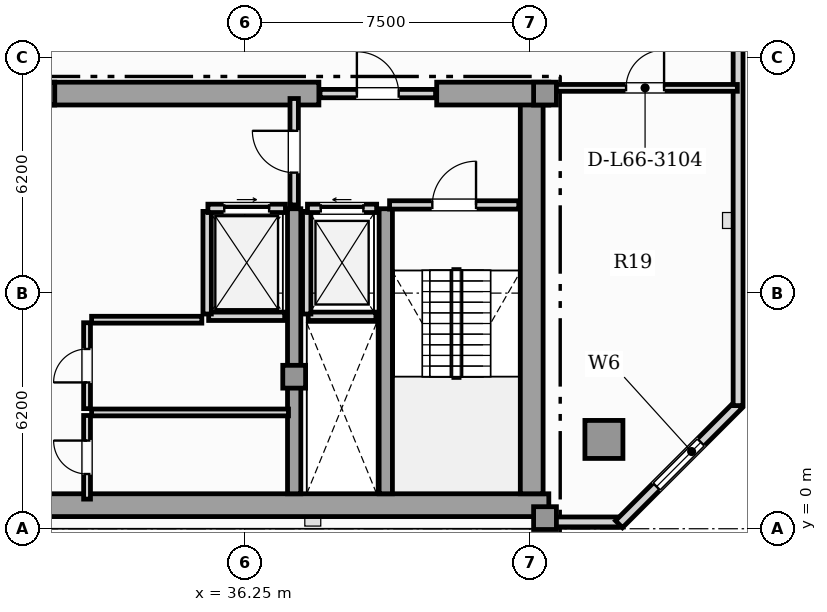
"""IFC4 building model, lengths in metres.
Left out: names, types, materials, properties, quantities, classifications, styles, units other than length and angle.
Written with IfcOpenShell. Run it as: python <this file> out.ifc"""

import sys

from ifc_helpers import new_model, si_unit, direction, frame, frame_2d, origin, origin_2d, place, context, subcontext, project, spatial, rectangle, hollow_rectangle, extrude, element, fill, save


model = new_model("IFC4")
c1 = context("Model", 3, precision=1e-05, world=origin(), true_north=direction((0.0, 1.0)))
c2 = subcontext(c1, "Body", "Model", "MODEL_VIEW")
j1 = project(units=[si_unit("LENGTHUNIT", "METRE"), si_unit("PLANEANGLEUNIT", "RADIAN")], contexts=[c1])
p1 = place(None, origin())
s1 = spatial("IfcSite", under=j1, at=p1, CompositionType="ELEMENT")
p2 = place(p1, origin())
s2 = spatial("IfcBuilding", under=s1, at=p2, CompositionType="ELEMENT")
p3 = place(p2, frame((0.0, 0.0, 268.3)))
s3 = spatial("IfcBuildingStorey", under=s2, at=p3, CompositionType="ELEMENT", Elevation=268.3)
p4 = place(p3, frame((13.25, 0.62, 0.0), z_axis=(0.0, 0.0, 1.0), x_axis=(1.0, 0.0, 0.0)))
e1 = element("IfcWall", 1, at=p4, inside=s3, PredefinedType="SHEAR", context=c2, shape_type="SweptSolid", body=[
    extrude(rectangle(XDim=31.0, YDim=0.6, at=frame_2d((15.5, 0.0))), origin(), (0.0, 0.0, 1.0), 3.65),
])
p5 = place(p3, frame((43.8, 0.92, 0.0), z_axis=(0.0, 0.0, 1.0), x_axis=(0.0, 1.0, 0.0)))
e2 = element("IfcWall", 2, at=p5, inside=s3, PredefinedType="SHEAR", context=c2, shape_type="SweptSolid", body=[
    extrude(rectangle(XDim=10.53, YDim=0.6, at=frame_2d((5.265, 0.0))), origin(), (0.0, 0.0, 1.0), 3.65),
])
p6 = place(p3, frame((30.9, 11.45, 0.0), z_axis=(0.0, 0.0, 1.0), x_axis=(1.0, 0.0, 0.0)))
e3 = element("IfcWall", 3, at=p6, inside=s3, PredefinedType="SHEAR", context=c2, shape_type="SweptSolid", body=[
    extrude(rectangle(XDim=7.3, YDim=0.6, at=frame_2d((3.65, 0.0))), origin(), (0.0, 0.0, 1.0), 3.65),
])
p7 = place(p3, frame((41.3, 11.45, 0.0), z_axis=(0.0, 0.0, 1.0), x_axis=(1.0, 0.0, 0.0)))
e4 = element("IfcWall", 4, at=p7, inside=s3, PredefinedType="SHEAR", context=c2, shape_type="SweptSolid", body=[
    extrude(rectangle(XDim=2.95, YDim=0.6, at=frame_2d((1.475, 0.0))), origin(), (0.0, 0.0, 1.0), 3.65),
])
for number, where, z_axis, x_axis in (
    (5, (37.55, 0.92, 0.0), (0.0, 0.0, 1.0), (0.0, 1.0, 0.0)),
    (6, (39.96, 0.92, 0.0), (0.0, 0.0, 1.0), (0.0, 1.0, 0.0)),
):
    element("IfcWall", number, at=place(p3, frame(where, z_axis=z_axis, x_axis=x_axis)), inside=s3, PredefinedType="SHEAR", context=c2, shape_type="SweptSolid", body=[
        extrude(rectangle(XDim=7.5, YDim=0.35, at=frame_2d((3.75, 0.0))), origin(), (0.0, 0.0, 1.0), 3.65),
    ])
for number, where, z_axis, x_axis in (
    (7, (44.15, 0.28, 0.0), (0.0, 0.0, 1.0), (1.0, 0.0, 0.0)),
    (8, (44.15, 11.45, 0.0), (0.0, 0.0, 1.0), (1.0, 0.0, 0.0)),
    (9, (37.55, 4.0, 0.0), (0.0, 0.0, 1.0), (1.0, 0.0, 0.0)),
    (10, (30.95, 11.45, 0.0), (0.0, 0.0, 1.0), (1.0, 0.0, 0.0)),
):
    element("IfcColumn", number, at=place(p3, frame(where, z_axis=z_axis, x_axis=x_axis)), inside=s3, PredefinedType="COLUMN", context=c2, shape_type="SweptSolid", body=[
        extrude(rectangle(XDim=0.6, YDim=0.6, at=origin_2d()), origin(), (0.0, 0.0, 1.0), 3.85),
    ])
p8 = place(p3, frame((45.7, 2.35, 0.0), z_axis=(0.0, 0.0, 1.0), x_axis=(1.0, 0.0, 0.0)))
e11 = element("IfcColumn", 11, at=p8, inside=s3, PredefinedType="USERDEFINED", context=c2, shape_type="SweptSolid", body=[
    extrude(hollow_rectangle(XDim=1.0, YDim=1.0, WallThickness=0.06, at=origin_2d()), origin(), (0.0, 0.0, 1.0), 3.85),
])
p9 = place(p3, frame((44.25, 0.18, 0.0), z_axis=(0.0, 0.0, 1.0), x_axis=(1.0, 0.0, 0.0)))
e12 = element("IfcWall", 12, at=p9, inside=s3, PredefinedType="SOLIDWALL", context=c2, shape_type="SweptSolid", body=[
    extrude(rectangle(XDim=1.87, YDim=0.26, at=frame_2d((0.935, 0.0))), origin(), (0.0, 0.0, 1.0), 3.65),
])
p10 = place(p3, frame((46.097, 0.12, 0.0), z_axis=(0.0, 0.0, 1.0), x_axis=(0.707079321262, 0.707134240044, 0.0)))
e13 = element("IfcWall", 13, at=p10, inside=s3, PredefinedType="SOLIDWALL", context=c2, shape_type="SweptSolid", body=[
    extrude(rectangle(XDim=4.446, YDim=0.26, at=frame_2d((2.223, 0.0))), origin(), (0.0, 0.0, 1.0), 3.65),
])
p11 = place(p10, frame((1.398, 0.0, 0.88)))
e14 = element("IfcOpeningElement", 14, at=p11, cuts=e13, PredefinedType="OPENING", context=c2, shape_type="SweptSolid", body=[
    extrude(rectangle(XDim=1.65, YDim=2.0, at=frame_2d((0.825, 1.0))), frame((0.0, 0.14, 0.0), z_axis=(0.0, -1.0, 0.0), x_axis=(1.0, 0.0, 0.0)), (0.0, 0.0, 1.0), 0.28),
])
p12 = place(p3, frame((49.23, 3.24, 0.0), z_axis=(0.0, 0.0, 1.0), x_axis=(0.0, 1.0, 0.0)))
e15 = element("IfcWall", 15, at=p12, inside=s3, PredefinedType="SOLIDWALL", context=c2, shape_type="SweptSolid", body=[
    extrude(rectangle(XDim=16.195, YDim=0.26, at=frame_2d((8.097, 0.0))), origin(), (0.0, 0.0, 1.0), 3.65),
])
p13 = place(p12, frame((11.055, 0.0, 0.95)))
e16 = element("IfcOpeningElement", 16, at=p13, cuts=e15, PredefinedType="OPENING", context=c2, shape_type="SweptSolid", body=[
    extrude(rectangle(XDim=0.9, YDim=1.5, at=frame_2d((0.45, 0.75))), frame((0.0, 0.14, 0.0), z_axis=(0.0, -1.0, 0.0), x_axis=(1.0, 0.0, 0.0)), (0.0, 0.0, 1.0), 0.28),
])
p14 = place(p12, frame((12.817, 0.0, 0.88)))
e17 = element("IfcOpeningElement", 17, at=p14, cuts=e15, PredefinedType="OPENING", context=c2, shape_type="SweptSolid", body=[
    extrude(rectangle(XDim=1.65, YDim=2.0, at=frame_2d((0.825, 1.0))), frame((0.0, 0.14, 0.0), z_axis=(0.0, -1.0, 0.0), x_axis=(1.0, 0.0, 0.0)), (0.0, 0.0, 1.0), 0.28),
])
p15 = place(p3, frame((37.92, 5.59, 0.0), z_axis=(0.0, 0.0, 1.0), x_axis=(1.0, 0.0, 0.0)))
e18 = element("IfcWall", 18, at=p15, inside=s3, PredefinedType="SOLIDWALL", context=c2, shape_type="SweptSolid", body=[
    extrude(rectangle(XDim=1.78, YDim=0.22, at=frame_2d((0.89, 0.0))), origin(), (0.0, 0.0, 1.0), 3.65),
])
p16 = place(p3, frame((37.88, 5.65, 0.0), z_axis=(0.0, 0.0, 1.0), x_axis=(0.0, 1.0, 0.0)))
e19 = element("IfcWall", 19, at=p16, inside=s3, PredefinedType="SOLIDWALL", context=c2, shape_type="SweptSolid", body=[
    extrude(rectangle(XDim=2.7, YDim=0.22, at=frame_2d((1.35, 0.0))), origin(), (0.0, 0.0, 1.0), 3.65),
])
p17 = place(p3, frame((37.9, 8.43, 0.0), z_axis=(0.0, 0.0, 1.0), x_axis=(1.0, 0.0, 0.0)))
e20 = element("IfcWall", 20, at=p17, inside=s3, PredefinedType="SOLIDWALL", context=c2, shape_type="SweptSolid", body=[
    extrude(rectangle(XDim=1.82, YDim=0.22, at=frame_2d((0.91, 0.0))), origin(), (0.0, 0.0, 1.0), 3.65),
])
p18 = place(p17, frame((0.35, 0.0, 0.0)))
e21 = element("IfcOpeningElement", 21, at=p18, cuts=e20, PredefinedType="OPENING", context=c2, shape_type="SweptSolid", body=[
    extrude(rectangle(XDim=1.12, YDim=2.25, at=frame_2d((0.56, 1.125))), frame((0.0, 0.12, 0.0), z_axis=(0.0, -1.0, 0.0), x_axis=(1.0, 0.0, 0.0)), (0.0, 0.0, 1.0), 0.24),
])
p19 = place(p3, frame((35.3, 5.59, 0.0), z_axis=(0.0, 0.0, 1.0), x_axis=(1.0, 0.0, 0.0)))
e22 = element("IfcWall", 22, at=p19, inside=s3, PredefinedType="SOLIDWALL", context=c2, shape_type="SweptSolid", body=[
    extrude(rectangle(XDim=2.0, YDim=0.22, at=frame_2d((1.0, 0.0))), origin(), (0.0, 0.0, 1.0), 3.65),
])
p20 = place(p3, frame((35.26, 5.65, 0.0), z_axis=(0.0, 0.0, 1.0), x_axis=(0.0, 1.0, 0.0)))
e23 = element("IfcWall", 23, at=p20, inside=s3, PredefinedType="SOLIDWALL", context=c2, shape_type="SweptSolid", body=[
    extrude(rectangle(XDim=2.7, YDim=0.22, at=frame_2d((1.35, 0.0))), origin(), (0.0, 0.0, 1.0), 3.65),
])
p21 = place(p3, frame((35.28, 8.43, 0.0), z_axis=(0.0, 0.0, 1.0), x_axis=(1.0, 0.0, 0.0)))
e24 = element("IfcWall", 24, at=p21, inside=s3, PredefinedType="SOLIDWALL", context=c2, shape_type="SweptSolid", body=[
    extrude(rectangle(XDim=2.04, YDim=0.22, at=frame_2d((1.02, 0.0))), origin(), (0.0, 0.0, 1.0), 3.65),
])
p22 = place(p21, frame((0.43, 0.0, 0.0)))
e25 = element("IfcOpeningElement", 25, at=p22, cuts=e24, PredefinedType="OPENING", context=c2, shape_type="SweptSolid", body=[
    extrude(rectangle(XDim=1.18, YDim=2.2, at=frame_2d((0.59, 1.1))), frame((0.0, 0.12, 0.0), z_axis=(0.0, -1.0, 0.0), x_axis=(1.0, 0.0, 0.0)), (0.0, 0.0, 1.0), 0.24),
])
p23 = place(p3, frame((40.06, 8.52, 0.0), z_axis=(0.0, 0.0, 1.0), x_axis=(1.0, 0.0, 0.0)))
e26 = element("IfcWall", 26, at=p23, inside=s3, PredefinedType="SOLIDWALL", context=c2, shape_type="SweptSolid", body=[
    extrude(rectangle(XDim=3.4, YDim=0.22, at=frame_2d((1.7, 0.0))), origin(), (0.0, 0.0, 1.0), 3.65),
])
p24 = place(p23, frame((1.125, 0.0, 0.0)))
e27 = element("IfcOpeningElement", 27, at=p24, cuts=e26, PredefinedType="OPENING", context=c2, shape_type="SweptSolid", body=[
    extrude(rectangle(XDim=1.15, YDim=2.2, at=frame_2d((0.575, 1.1))), frame((0.0, 0.12, 0.0), z_axis=(0.0, -1.0, 0.0), x_axis=(1.0, 0.0, 0.0)), (0.0, 0.0, 1.0), 0.24),
])
p25 = place(p3, frame((37.55, 8.52, 0.0), z_axis=(0.0, 0.0, 1.0), x_axis=(0.0, 1.0, 0.0)))
e28 = element("IfcWall", 28, at=p25, inside=s3, PredefinedType="SOLIDWALL", context=c2, shape_type="SweptSolid", body=[
    extrude(rectangle(XDim=2.8, YDim=0.22, at=frame_2d((1.4, 0.0))), origin(), (0.0, 0.0, 1.0), 3.105),
])
p26 = place(p25, frame((0.85, 0.0, 0.0)))
e29 = element("IfcOpeningElement", 29, at=p26, cuts=e28, PredefinedType="OPENING", context=c2, shape_type="SweptSolid", body=[
    extrude(rectangle(XDim=1.1, YDim=2.2, at=frame_2d((0.55, 1.1))), frame((0.0, 0.12, 0.0), z_axis=(0.0, -1.0, 0.0), x_axis=(1.0, 0.0, 0.0)), (0.0, 0.0, 1.0), 0.24),
])
p27 = place(p3, frame((38.23, 11.45, 0.0), z_axis=(0.0, 0.0, 1.0), x_axis=(1.0, 0.0, 0.0)))
e30 = element("IfcWall", 30, at=p27, inside=s3, PredefinedType="SOLIDWALL", context=c2, shape_type="SweptSolid", body=[
    extrude(rectangle(XDim=3.04, YDim=0.22, at=frame_2d((1.52, 0.0))), origin(), (0.0, 0.0, 1.0), 3.65),
])
p28 = place(p27, frame((0.97, 0.0, 0.0)))
e31 = element("IfcOpeningElement", 31, at=p28, cuts=e30, PredefinedType="OPENING", context=c2, shape_type="SweptSolid", body=[
    extrude(rectangle(XDim=1.1, YDim=2.2, at=frame_2d((0.55, 1.1))), frame((0.0, 0.12, 0.0), z_axis=(0.0, -1.0, 0.0), x_axis=(1.0, 0.0, 0.0)), (0.0, 0.0, 1.0), 0.24),
])
p29 = place(p3, frame((32.1, 0.78, 0.0), z_axis=(0.0, 0.0, 1.0), x_axis=(0.0, 1.0, 0.0)))
e32 = element("IfcWall", 32, at=p29, inside=s3, PredefinedType="PARTITIONING", context=c2, shape_type="SweptSolid", body=[
    extrude(rectangle(XDim=2.2, YDim=0.18, at=frame_2d((1.1, 0.0))), origin(), (0.0, 0.0, 1.0), 3.65),
])
p30 = place(p29, frame((0.66, 0.0, 0.0)))
e33 = element("IfcOpeningElement", 33, at=p30, cuts=e32, PredefinedType="OPENING", context=c2, shape_type="SweptSolid", body=[
    extrude(rectangle(XDim=0.88, YDim=2.05, at=frame_2d((0.44, 1.025))), frame((0.0, 0.1, 0.0), z_axis=(0.0, -1.0, 0.0), x_axis=(1.0, 0.0, 0.0)), (0.0, 0.0, 1.0), 0.2),
])
p31 = place(p3, frame((32.22, 3.06, 0.0), z_axis=(0.0, 0.0, 1.0), x_axis=(1.0, 0.0, 0.0)))
e34 = element("IfcWall", 34, at=p31, inside=s3, PredefinedType="PARTITIONING", context=c2, shape_type="SweptSolid", body=[
    extrude(rectangle(XDim=5.18, YDim=0.18, at=frame_2d((2.59, 0.0))), origin(), (0.0, 0.0, 1.0), 3.65),
])
p32 = place(p3, frame((32.1, 3.16, 0.0), z_axis=(0.0, 0.0, 1.0), x_axis=(0.0, 1.0, 0.0)))
e35 = element("IfcWall", 35, at=p32, inside=s3, PredefinedType="PARTITIONING", context=c2, shape_type="SweptSolid", body=[
    extrude(rectangle(XDim=2.26, YDim=0.18, at=frame_2d((1.13, 0.0))), origin(), (0.0, 0.0, 1.0), 3.65),
])
p33 = place(p32, frame((0.69, 0.0, 0.0)))
e36 = element("IfcOpeningElement", 36, at=p33, cuts=e35, PredefinedType="OPENING", context=c2, shape_type="SweptSolid", body=[
    extrude(rectangle(XDim=0.88, YDim=2.05, at=frame_2d((0.44, 1.025))), frame((0.0, 0.1, 0.0), z_axis=(0.0, -1.0, 0.0), x_axis=(1.0, 0.0, 0.0)), (0.0, 0.0, 1.0), 0.2),
])
p34 = place(p3, frame((32.22, 5.5, 0.0), z_axis=(0.0, 0.0, 1.0), x_axis=(1.0, 0.0, 0.0)))
e37 = element("IfcWall", 37, at=p34, inside=s3, PredefinedType="PARTITIONING", context=c2, shape_type="SweptSolid", body=[
    extrude(rectangle(XDim=2.9, YDim=0.18, at=frame_2d((1.45, 0.0))), origin(), (0.0, 0.0, 1.0), 3.65),
])
p35 = place(p3, frame((44.355, 11.6, 0.0), z_axis=(0.0, 0.0, 1.0), x_axis=(1.0, 0.0, 0.0)))
e38 = element("IfcWall", 38, at=p35, inside=s3, PredefinedType="PARTITIONING", context=c2, shape_type="SweptSolid", body=[
    extrude(rectangle(XDim=4.856, YDim=0.18, at=frame_2d((2.428, 0.0))), origin(), (0.0, 0.0, 1.0), 3.65),
])
p36 = place(p35, frame((1.928, 0.0, 0.0)))
e39 = element("IfcOpeningElement", 39, at=p36, cuts=e38, PredefinedType="OPENING", context=c2, shape_type="SweptSolid", body=[
    extrude(rectangle(XDim=1.0, YDim=2.15, at=frame_2d((0.5, 1.075))), frame((0.0, 0.1, 0.0), z_axis=(0.0, -1.0, 0.0), x_axis=(1.0, 0.0, 0.0)), (0.0, 0.0, 1.0), 0.2),
])
p37 = place(p11, origin())
e40 = element("IfcWindow", 40, at=p37, inside=s3, PartitioningType="SINGLE_PANEL", PredefinedType="WINDOW", context=c2, shape_type="SweptSolid", body=[
    extrude(rectangle(XDim=1.65, YDim=2.0, at=frame_2d((0.825, 1.0))), frame((0.0, 0.03, 0.0), z_axis=(0.0, -1.0, 0.0), x_axis=(1.0, 0.0, 0.0)), (0.0, 0.0, 1.0), 0.06),
])
fill(e14, e40)
p38 = place(p18, origin())
e41 = element("IfcDoor", 41, at=p38, inside=s3, OperationType="SLIDING_TO_LEFT", PredefinedType="DOOR", context=c2, shape_type="SweptSolid", body=[
    extrude(rectangle(XDim=1.12, YDim=2.25, at=frame_2d((0.56, 1.125))), frame((0.0, 0.025, 0.0), z_axis=(0.0, -1.0, 0.0), x_axis=(1.0, 0.0, 0.0)), (0.0, 0.0, 1.0), 0.05),
])
fill(e21, e41)
p39 = place(p22, origin())
e42 = element("IfcDoor", 42, at=p39, inside=s3, OperationType="SLIDING_TO_RIGHT", PredefinedType="DOOR", context=c2, shape_type="SweptSolid", body=[
    extrude(rectangle(XDim=1.18, YDim=2.2, at=frame_2d((0.59, 1.1))), frame((0.0, 0.025, 0.0), z_axis=(0.0, -1.0, 0.0), x_axis=(1.0, 0.0, 0.0)), (0.0, 0.0, 1.0), 0.05),
])
fill(e25, e42)
p40 = place(p24, origin())
e43 = element("IfcDoor", 43, at=p40, inside=s3, OperationType="SINGLE_SWING_RIGHT", PredefinedType="DOOR", context=c2, shape_type="SweptSolid", body=[
    extrude(rectangle(XDim=1.15, YDim=2.2, at=frame_2d((0.575, 1.1))), frame((0.0, 0.025, 0.0), z_axis=(0.0, -1.0, 0.0), x_axis=(1.0, 0.0, 0.0)), (0.0, 0.0, 1.0), 0.05),
])
fill(e27, e43)
p41 = place(p26, origin())
e44 = element("IfcDoor", 44, at=p41, inside=s3, OperationType="SINGLE_SWING_RIGHT", PredefinedType="DOOR", context=c2, shape_type="SweptSolid", body=[
    extrude(rectangle(XDim=1.1, YDim=2.2, at=frame_2d((0.55, 1.1))), frame((0.0, 0.025, 0.0), z_axis=(0.0, -1.0, 0.0), x_axis=(1.0, 0.0, 0.0)), (0.0, 0.0, 1.0), 0.05),
])
fill(e29, e44)
p42 = place(p28, origin())
e45 = element("IfcDoor", 45, at=p42, inside=s3, OperationType="SINGLE_SWING_LEFT", PredefinedType="DOOR", context=c2, shape_type="SweptSolid", body=[
    extrude(rectangle(XDim=1.1, YDim=2.2, at=frame_2d((0.55, 1.1))), frame((0.0, 0.025, 0.0), z_axis=(0.0, -1.0, 0.0), x_axis=(1.0, 0.0, 0.0)), (0.0, 0.0, 1.0), 0.05),
])
fill(e31, e45)
p43 = place(p30, origin())
e46 = element("IfcDoor", 46, at=p43, inside=s3, OperationType="SINGLE_SWING_RIGHT", PredefinedType="DOOR", context=c2, shape_type="SweptSolid", body=[
    extrude(rectangle(XDim=0.88, YDim=2.05, at=frame_2d((0.44, 1.025))), frame((0.0, 0.025, 0.0), z_axis=(0.0, -1.0, 0.0), x_axis=(1.0, 0.0, 0.0)), (0.0, 0.0, 1.0), 0.05),
])
fill(e33, e46)
p44 = place(p33, origin())
e47 = element("IfcDoor", 47, at=p44, inside=s3, OperationType="SINGLE_SWING_LEFT", PredefinedType="DOOR", context=c2, shape_type="SweptSolid", body=[
    extrude(rectangle(XDim=0.88, YDim=2.05, at=frame_2d((0.44, 1.025))), frame((0.0, 0.025, 0.0), z_axis=(0.0, -1.0, 0.0), x_axis=(1.0, 0.0, 0.0)), (0.0, 0.0, 1.0), 0.05),
])
fill(e36, e47)
p45 = place(p36, origin())
e48 = element("IfcDoor", 48, at=p45, inside=s3, OperationType="SINGLE_SWING_RIGHT", PredefinedType="DOOR", context=c2, shape_type="SweptSolid", body=[
    extrude(rectangle(XDim=1.0, YDim=2.15, at=frame_2d((0.5, 1.075))), frame((0.0, 0.025, 0.0), z_axis=(0.0, -1.0, 0.0), x_axis=(1.0, 0.0, 0.0)), (0.0, 0.0, 1.0), 0.05),
])
fill(e39, e48)
save(model, sys.argv[1])
